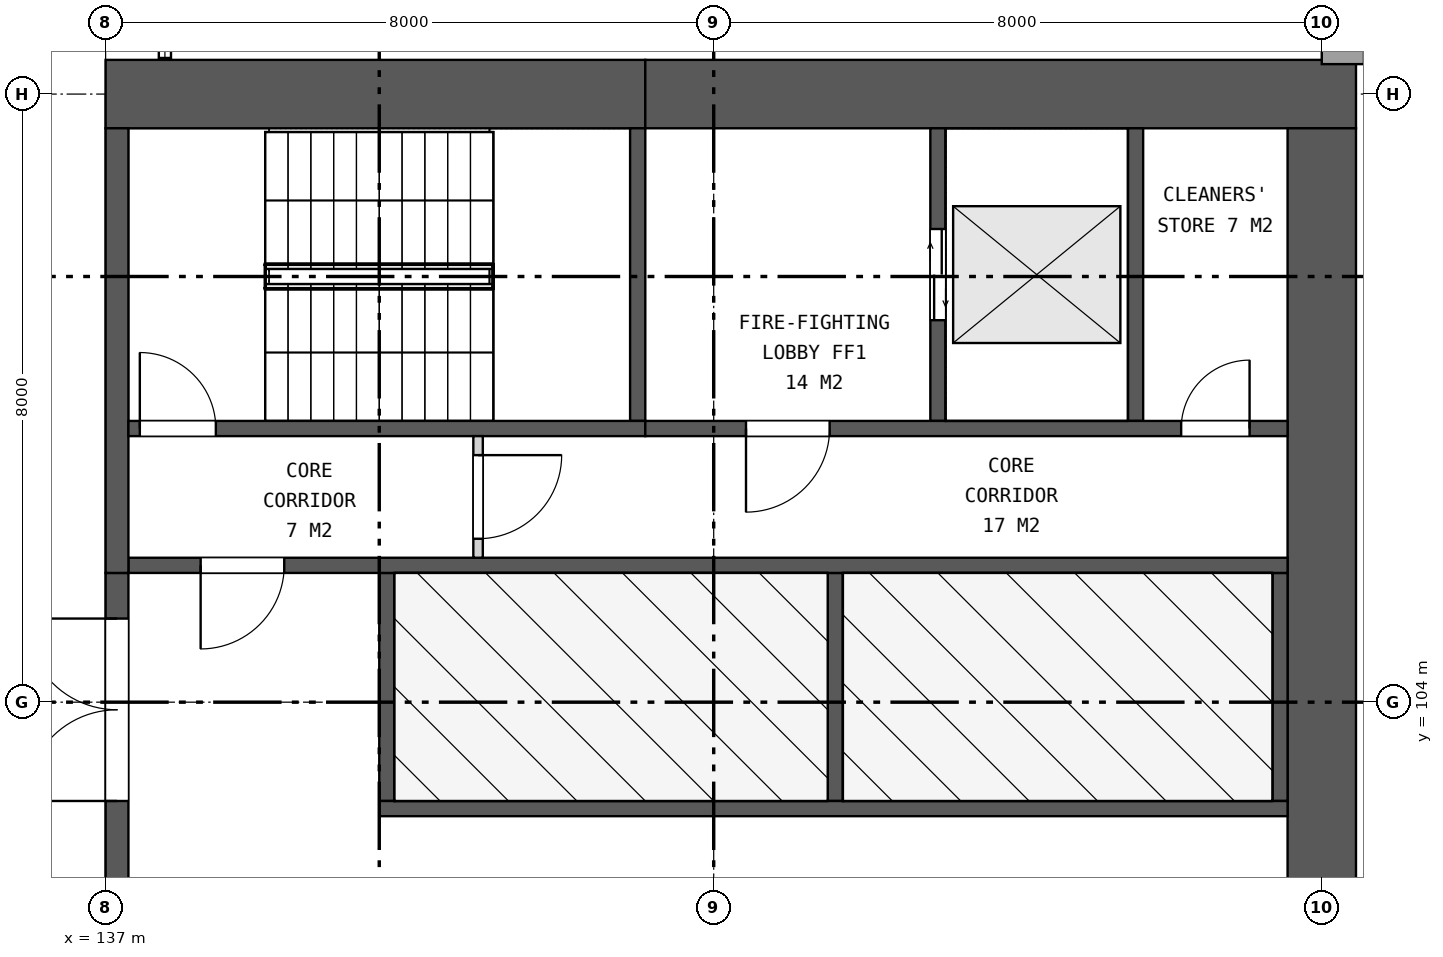
"""IFC4 building model, lengths in metres.
Left out: names, types, materials, properties, quantities, classifications, styles, units other than length and angle.
Written with IfcOpenShell. Run it as: python <this file> out.ifc"""

import sys

from ifc_helpers import new_model, si_unit, direction, frame, frame_2d, origin, place, context, subcontext, project, spatial, rectangle, extrude, element, fill, save


model = new_model("IFC4")
c1 = context("Model", 3, precision=1e-05, world=origin(), true_north=direction((0.0, 1.0)))
c2 = subcontext(c1, "Body", "Model", "MODEL_VIEW")
j1 = project(units=[si_unit("LENGTHUNIT", "METRE"), si_unit("PLANEANGLEUNIT", "RADIAN")], contexts=[c1])
p1 = place(None, origin())
s1 = spatial("IfcSite", under=j1, at=p1, CompositionType="ELEMENT")
p2 = place(p1, origin())
s2 = spatial("IfcBuilding", under=s1, at=p2, CompositionType="ELEMENT")
p3 = place(p2, frame((0.0, 0.0, 34.0)))
s3 = spatial("IfcBuildingStorey", under=s2, at=p3, CompositionType="ELEMENT", Elevation=34.0)
p4 = place(p3, frame((137.0, 112.0, 0.0), z_axis=(0.0, 0.0, 1.0), x_axis=(1.0, 0.0, 0.0)))
e1 = element("IfcWall", 1, at=p4, inside=s3, PredefinedType="SHEAR", context=c2, shape_type="SweptSolid", body=[
    extrude(rectangle(XDim=7.1, YDim=0.9, at=frame_2d((3.55, 0.0))), origin(), (0.0, 0.0, 1.0), 7.5),
])
p5 = place(p3, frame((144.1, 112.0, 0.0), z_axis=(0.0, 0.0, 1.0), x_axis=(1.0, 0.0, 0.0)))
e2 = element("IfcWall", 2, at=p5, inside=s3, PredefinedType="SHEAR", context=c2, shape_type="SweptSolid", body=[
    extrude(rectangle(XDim=9.35, YDim=0.9, at=frame_2d((4.675, 0.0))), origin(), (0.0, 0.0, 1.0), 7.5),
])
p6 = place(p3, frame((153.0, 88.45, 0.0), z_axis=(0.0, 0.0, 1.0), x_axis=(0.0, 1.0, 0.0)))
e3 = element("IfcWall", 3, at=p6, inside=s3, PredefinedType="SHEAR", context=c2, shape_type="SweptSolid", body=[
    extrude(rectangle(XDim=23.1, YDim=0.9, at=frame_2d((11.55, 0.0))), origin(), (0.0, 0.0, 1.0), 7.5),
])
p7 = place(p6, frame((10.35, 0.0, 0.0)))
e4 = element("IfcOpeningElement", 4, at=p7, cuts=e3, PredefinedType="OPENING", context=c2, shape_type="SweptSolid", body=[
    extrude(rectangle(XDim=2.4, YDim=2.4, at=frame_2d((1.2, 1.2))), frame((0.0, 0.46, 0.0), z_axis=(0.0, -1.0, 0.0), x_axis=(1.0, 0.0, 0.0)), (0.0, 0.0, 1.0), 0.92),
])
p8 = place(p3, frame((137.15, 94.3, 0.0), z_axis=(0.0, 0.0, 1.0), x_axis=(0.0, 1.0, 0.0)))
e5 = element("IfcWall", 5, at=p8, inside=s3, PredefinedType="SHEAR", context=c2, shape_type="SweptSolid", body=[
    extrude(rectangle(XDim=11.4, YDim=0.3, at=frame_2d((5.7, 0.0))), origin(), (0.0, 0.0, 1.0), 7.5),
])
p9 = place(p8, frame((0.6, 0.0, 0.0)))
e6 = element("IfcOpeningElement", 6, at=p9, cuts=e5, PredefinedType="OPENING", context=c2, shape_type="SweptSolid", body=[
    extrude(rectangle(XDim=2.4, YDim=2.4, at=frame_2d((1.2, 1.2))), frame((0.0, 0.16, 0.0), z_axis=(0.0, -1.0, 0.0), x_axis=(1.0, 0.0, 0.0)), (0.0, 0.0, 1.0), 0.32),
])
p10 = place(p8, frame((4.5, 0.0, 0.0)))
e7 = element("IfcOpeningElement", 7, at=p10, cuts=e5, PredefinedType="OPENING", context=c2, shape_type="SweptSolid", body=[
    extrude(rectangle(XDim=2.4, YDim=2.4, at=frame_2d((1.2, 1.2))), frame((0.0, 0.16, 0.0), z_axis=(0.0, -1.0, 0.0), x_axis=(1.0, 0.0, 0.0)), (0.0, 0.0, 1.0), 0.32),
])
p11 = place(p8, frame((8.4, 0.0, 0.0)))
e8 = element("IfcOpeningElement", 8, at=p11, cuts=e5, PredefinedType="OPENING", context=c2, shape_type="SweptSolid", body=[
    extrude(rectangle(XDim=2.4, YDim=2.4, at=frame_2d((1.2, 1.2))), frame((0.0, 0.16, 0.0), z_axis=(0.0, -1.0, 0.0), x_axis=(1.0, 0.0, 0.0)), (0.0, 0.0, 1.0), 0.32),
])
for number, where, z_axis, x_axis in (
    (9, (140.7, 102.7, 0.0), (0.0, 0.0, 1.0), (0.0, 1.0, 0.0)),
    (10, (146.6, 102.7, 0.0), (0.0, 0.0, 1.0), (0.0, 1.0, 0.0)),
    (11, (152.45, 102.7, 0.0), (0.0, 0.0, 1.0), (0.0, 1.0, 0.0)),
):
    element("IfcWall", number, at=place(p3, frame(where, z_axis=z_axis, x_axis=x_axis)), inside=s3, PredefinedType="SHEAR", context=c2, shape_type="SweptSolid", body=[
        extrude(rectangle(XDim=3.0, YDim=0.2, at=frame_2d((1.5, 0.0))), origin(), (0.0, 0.0, 1.0), 7.5),
    ])
p12 = place(p3, frame((140.6, 102.6, 0.0), z_axis=(0.0, 0.0, 1.0), x_axis=(1.0, 0.0, 0.0)))
e12 = element("IfcWall", 12, at=p12, inside=s3, PredefinedType="SHEAR", context=c2, shape_type="SweptSolid", body=[
    extrude(rectangle(XDim=11.95, YDim=0.2, at=frame_2d((5.975, 0.0))), origin(), (0.0, 0.0, 1.0), 7.5),
])
p13 = place(p3, frame((137.3, 105.8, 0.0), z_axis=(0.0, 0.0, 1.0), x_axis=(1.0, 0.0, 0.0)))
e13 = element("IfcWall", 13, at=p13, inside=s3, PredefinedType="SHEAR", context=c2, shape_type="SweptSolid", body=[
    extrude(rectangle(XDim=15.25, YDim=0.2, at=frame_2d((7.625, 0.0))), origin(), (0.0, 0.0, 1.0), 7.5),
])
p14 = place(p13, frame((0.95, 0.0, 0.0)))
e14 = element("IfcOpeningElement", 14, at=p14, cuts=e13, PredefinedType="OPENING", context=c2, shape_type="SweptSolid", body=[
    extrude(rectangle(XDim=1.1, YDim=2.1, at=frame_2d((0.55, 1.05))), frame((0.0, 0.11, 0.0), z_axis=(0.0, -1.0, 0.0), x_axis=(1.0, 0.0, 0.0)), (0.0, 0.0, 1.0), 0.22),
])
p15 = place(p3, frame((137.15, 105.7, 0.0), z_axis=(0.0, 0.0, 1.0), x_axis=(0.0, 1.0, 0.0)))
e15 = element("IfcWall", 15, at=p15, inside=s3, PredefinedType="SHEAR", context=c2, shape_type="SweptSolid", body=[
    extrude(rectangle(XDim=5.85, YDim=0.3, at=frame_2d((2.925, 0.0))), origin(), (0.0, 0.0, 1.0), 7.5),
])
p16 = place(p3, frame((144.0, 107.7, 0.0), z_axis=(0.0, 0.0, 1.0), x_axis=(0.0, 1.0, 0.0)))
e16 = element("IfcWall", 16, at=p16, inside=s3, PredefinedType="SHEAR", context=c2, shape_type="SweptSolid", body=[
    extrude(rectangle(XDim=3.85, YDim=0.2, at=frame_2d((1.925, 0.0))), origin(), (0.0, 0.0, 1.0), 7.5),
])
p17 = place(p3, frame((147.95, 107.7, 0.0), z_axis=(0.0, 0.0, 1.0), x_axis=(0.0, 1.0, 0.0)))
e17 = element("IfcWall", 17, at=p17, inside=s3, PredefinedType="SHEAR", context=c2, shape_type="SweptSolid", body=[
    extrude(rectangle(XDim=3.85, YDim=0.2, at=frame_2d((1.925, 0.0))), origin(), (0.0, 0.0, 1.0), 7.5),
])
p18 = place(p17, frame((1.325, 0.0, 0.0)))
e18 = element("IfcOpeningElement", 18, at=p18, cuts=e17, PredefinedType="OPENING", context=c2, shape_type="SweptSolid", body=[
    extrude(rectangle(XDim=1.2, YDim=2.1, at=frame_2d((0.6, 1.05))), frame((0.0, 0.11, 0.0), z_axis=(0.0, -1.0, 0.0), x_axis=(1.0, 0.0, 0.0)), (0.0, 0.0, 1.0), 0.22),
])
p19 = place(p3, frame((150.55, 107.7, 0.0), z_axis=(0.0, 0.0, 1.0), x_axis=(0.0, 1.0, 0.0)))
e19 = element("IfcWall", 19, at=p19, inside=s3, PredefinedType="SHEAR", context=c2, shape_type="SweptSolid", body=[
    extrude(rectangle(XDim=3.85, YDim=0.2, at=frame_2d((1.925, 0.0))), origin(), (0.0, 0.0, 1.0), 7.5),
])
p20 = place(p3, frame((137.3, 107.6, 0.0), z_axis=(0.0, 0.0, 1.0), x_axis=(1.0, 0.0, 0.0)))
e20 = element("IfcWall", 20, at=p20, inside=s3, PredefinedType="SHEAR", context=c2, shape_type="SweptSolid", body=[
    extrude(rectangle(XDim=6.8, YDim=0.2, at=frame_2d((3.4, 0.0))), origin(), (0.0, 0.0, 1.0), 7.5),
])
p21 = place(p20, frame((0.15, 0.0, 0.0)))
e21 = element("IfcOpeningElement", 21, at=p21, cuts=e20, PredefinedType="OPENING", context=c2, shape_type="SweptSolid", body=[
    extrude(rectangle(XDim=1.0, YDim=2.1, at=frame_2d((0.5, 1.05))), frame((0.0, 0.11, 0.0), z_axis=(0.0, -1.0, 0.0), x_axis=(1.0, 0.0, 0.0)), (0.0, 0.0, 1.0), 0.22),
])
p22 = place(p3, frame((144.1, 107.6, 0.0), z_axis=(0.0, 0.0, 1.0), x_axis=(1.0, 0.0, 0.0)))
e22 = element("IfcWall", 22, at=p22, inside=s3, PredefinedType="SHEAR", context=c2, shape_type="SweptSolid", body=[
    extrude(rectangle(XDim=8.45, YDim=0.2, at=frame_2d((4.225, 0.0))), origin(), (0.0, 0.0, 1.0), 7.5),
])
p23 = place(p22, frame((1.325, 0.0, 0.0)))
e23 = element("IfcOpeningElement", 23, at=p23, cuts=e22, PredefinedType="OPENING", context=c2, shape_type="SweptSolid", body=[
    extrude(rectangle(XDim=1.1, YDim=2.1, at=frame_2d((0.55, 1.05))), frame((0.0, 0.11, 0.0), z_axis=(0.0, -1.0, 0.0), x_axis=(1.0, 0.0, 0.0)), (0.0, 0.0, 1.0), 0.22),
])
p24 = place(p22, frame((7.05, 0.0, 0.0)))
e24 = element("IfcOpeningElement", 24, at=p24, cuts=e22, PredefinedType="OPENING", context=c2, shape_type="SweptSolid", body=[
    extrude(rectangle(XDim=0.9, YDim=2.1, at=frame_2d((0.45, 1.05))), frame((0.0, 0.11, 0.0), z_axis=(0.0, -1.0, 0.0), x_axis=(1.0, 0.0, 0.0)), (0.0, 0.0, 1.0), 0.22),
])
p25 = place(p3, frame((141.9, 105.9, 0.0), z_axis=(0.0, 0.0, 1.0), x_axis=(0.0, 1.0, 0.0)))
e25 = element("IfcWall", 25, at=p25, inside=s3, PredefinedType="PARTITIONING", context=c2, shape_type="SweptSolid", body=[
    extrude(rectangle(XDim=1.6, YDim=0.125, at=frame_2d((0.8, 0.0))), origin(), (0.0, 0.0, 1.0), 7.5),
])
p26 = place(p25, frame((0.25, 0.0, 0.0)))
e26 = element("IfcOpeningElement", 26, at=p26, cuts=e25, PredefinedType="OPENING", context=c2, shape_type="SweptSolid", body=[
    extrude(rectangle(XDim=1.1, YDim=2.1, at=frame_2d((0.55, 1.05))), frame((0.0, 0.073, 0.0), z_axis=(0.0, -1.0, 0.0), x_axis=(1.0, 0.0, 0.0)), (0.0, 0.0, 1.0), 0.145),
])
p27 = place(p3, frame((153.0, 112.547, 0.0), z_axis=(0.0, 0.0, 1.0), x_axis=(1.0, 0.0, 0.0)))
e27 = element("IfcWall", 27, at=p27, inside=s3, PredefinedType="SOLIDWALL", context=c2, shape_type="SweptSolid", body=[
    extrude(rectangle(XDim=0.555, YDim=0.306, at=frame_2d((0.277, 0.0))), origin(), (0.0, 0.0, 1.0), 7.1),
])
p28 = place(p11, origin())
e28 = element("IfcDoor", 28, at=p28, inside=s3, OperationType="DOUBLE_DOOR_SINGLE_SWING", PredefinedType="DOOR", context=c2, shape_type="SweptSolid", body=[
    extrude(rectangle(XDim=2.4, YDim=2.4, at=frame_2d((1.2, 1.2))), frame((0.0, 0.025, 0.0), z_axis=(0.0, -1.0, 0.0), x_axis=(1.0, 0.0, 0.0)), (0.0, 0.0, 1.0), 0.05),
])
fill(e8, e28)
p29 = place(p14, frame((1.1, 0.0, 0.0), z_axis=(0.0, 0.0, 1.0), x_axis=(-1.0, 0.0, 0.0)))
e29 = element("IfcDoor", 29, at=p29, inside=s3, OperationType="SINGLE_SWING_RIGHT", PredefinedType="DOOR", context=c2, shape_type="SweptSolid", body=[
    extrude(rectangle(XDim=1.1, YDim=2.1, at=frame_2d((0.55, 1.05))), frame((0.0, 0.025, 0.0), z_axis=(0.0, -1.0, 0.0), x_axis=(1.0, 0.0, 0.0)), (0.0, 0.0, 1.0), 0.05),
])
fill(e14, e29)
p30 = place(p18, origin())
e30 = element("IfcDoor", 30, at=p30, inside=s3, OperationType="DOUBLE_DOOR_SLIDING", PredefinedType="DOOR", context=c2, shape_type="SweptSolid", body=[
    extrude(rectangle(XDim=1.2, YDim=2.1, at=frame_2d((0.6, 1.05))), frame((0.0, 0.025, 0.0), z_axis=(0.0, -1.0, 0.0), x_axis=(1.0, 0.0, 0.0)), (0.0, 0.0, 1.0), 0.05),
])
fill(e18, e30)
p31 = place(p21, origin())
e31 = element("IfcDoor", 31, at=p31, inside=s3, OperationType="SINGLE_SWING_LEFT", PredefinedType="DOOR", context=c2, shape_type="SweptSolid", body=[
    extrude(rectangle(XDim=1.0, YDim=2.1, at=frame_2d((0.5, 1.05))), frame((0.0, 0.025, 0.0), z_axis=(0.0, -1.0, 0.0), x_axis=(1.0, 0.0, 0.0)), (0.0, 0.0, 1.0), 0.05),
])
fill(e21, e31)
p32 = place(p23, frame((1.1, 0.0, 0.0), z_axis=(0.0, 0.0, 1.0), x_axis=(-1.0, 0.0, 0.0)))
e32 = element("IfcDoor", 32, at=p32, inside=s3, OperationType="SINGLE_SWING_RIGHT", PredefinedType="DOOR", context=c2, shape_type="SweptSolid", body=[
    extrude(rectangle(XDim=1.1, YDim=2.1, at=frame_2d((0.55, 1.05))), frame((0.0, 0.025, 0.0), z_axis=(0.0, -1.0, 0.0), x_axis=(1.0, 0.0, 0.0)), (0.0, 0.0, 1.0), 0.05),
])
fill(e23, e32)
p33 = place(p24, origin())
e33 = element("IfcDoor", 33, at=p33, inside=s3, OperationType="SINGLE_SWING_RIGHT", PredefinedType="DOOR", context=c2, shape_type="SweptSolid", body=[
    extrude(rectangle(XDim=0.9, YDim=2.1, at=frame_2d((0.45, 1.05))), frame((0.0, 0.025, 0.0), z_axis=(0.0, -1.0, 0.0), x_axis=(1.0, 0.0, 0.0)), (0.0, 0.0, 1.0), 0.05),
])
fill(e24, e33)
p34 = place(p26, frame((1.1, 0.0, 0.0), z_axis=(0.0, 0.0, 1.0), x_axis=(-1.0, 0.0, 0.0)))
e34 = element("IfcDoor", 34, at=p34, inside=s3, OperationType="SINGLE_SWING_LEFT", PredefinedType="DOOR", context=c2, shape_type="SweptSolid", body=[
    extrude(rectangle(XDim=1.1, YDim=2.1, at=frame_2d((0.55, 1.05))), frame((0.0, 0.025, 0.0), z_axis=(0.0, -1.0, 0.0), x_axis=(1.0, 0.0, 0.0)), (0.0, 0.0, 1.0), 0.05),
])
fill(e26, e34)
save(model, sys.argv[1])
